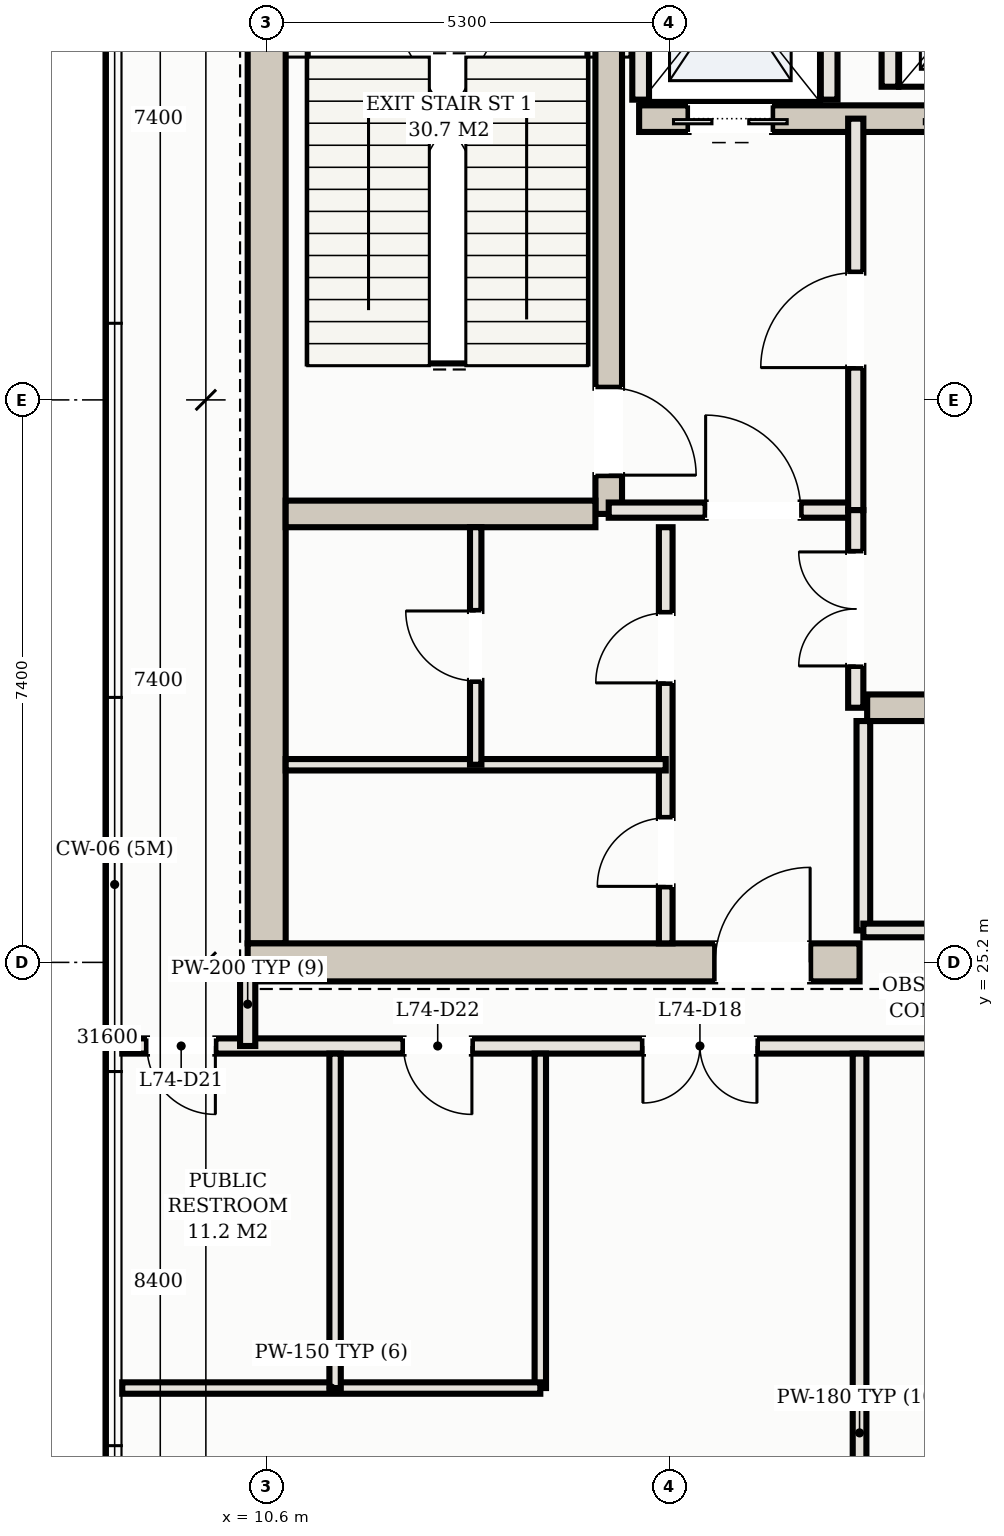
"""IFC4 building model, lengths in metres.
Left out: names, types, materials, properties, quantities, classifications, styles, units other than length and angle.
Written with IfcOpenShell. Run it as: python <this file> out.ifc"""

import sys

from ifc_helpers import new_model, si_unit, direction, frame, frame_2d, origin, place, context, subcontext, project, spatial, rectangle, extrude, element, fill, save


model = new_model("IFC4")
c1 = context("Model", 3, precision=1e-05, world=origin(), true_north=direction((0.0, 1.0)))
c2 = subcontext(c1, "Body", "Model", "MODEL_VIEW")
j1 = project(units=[si_unit("LENGTHUNIT", "METRE"), si_unit("PLANEANGLEUNIT", "RADIAN")], contexts=[c1])
p1 = place(None, origin())
s1 = spatial("IfcSite", under=j1, at=p1, CompositionType="ELEMENT")
p2 = place(p1, origin())
s2 = spatial("IfcBuilding", under=s1, at=p2, CompositionType="ELEMENT")
p3 = place(p2, frame((0.0, 0.0, 266.0)))
s3 = spatial("IfcBuildingStorey", under=s2, at=p3, CompositionType="ELEMENT", Elevation=266.0)
p4 = place(p3, frame((10.6, 25.45, 0.0), z_axis=(0.0, 0.0, 1.0), x_axis=(0.0, 1.0, 0.0)))
e1 = element("IfcWall", 1, at=p4, inside=s3, PredefinedType="SHEAR", context=c2, shape_type="SweptSolid", body=[
    extrude(rectangle(XDim=14.3, YDim=0.5, at=frame_2d((7.15, 0.0))), origin(), (0.0, 0.0, 1.0), 4.52),
])
p5 = place(p3, frame((10.35, 25.2, 0.0), z_axis=(0.0, 0.0, 1.0), x_axis=(1.0, 0.0, 0.0)))
e2 = element("IfcWall", 2, at=p5, inside=s3, PredefinedType="SHEAR", context=c2, shape_type="SweptSolid", body=[
    extrude(rectangle(XDim=8.05, YDim=0.5, at=frame_2d((4.025, 0.0))), origin(), (0.0, 0.0, 1.0), 4.52),
])
p6 = place(p5, frame((6.15, 0.0, 0.0)))
e3 = element("IfcOpeningElement", 3, at=p6, cuts=e2, PredefinedType="OPENING", context=c2, shape_type="SweptSolid", body=[
    extrude(rectangle(XDim=1.25, YDim=2.2, at=frame_2d((0.625, 1.1))), frame((0.0, 0.26, 0.0), z_axis=(0.0, -1.0, 0.0), x_axis=(1.0, 0.0, 0.0)), (0.0, 0.0, 1.0), 0.52),
])
p7 = place(p3, frame((15.1, 31.1, 0.0), z_axis=(0.0, 0.0, 1.0), x_axis=(0.0, 1.0, 0.0)))
e4 = element("IfcWall", 4, at=p7, inside=s3, PredefinedType="SHEAR", context=c2, shape_type="SweptSolid", body=[
    extrude(rectangle(XDim=8.65, YDim=0.35, at=frame_2d((4.325, 0.0))), origin(), (0.0, 0.0, 1.0), 4.52),
])
p8 = place(p7, frame((0.51, 0.0, 0.0)))
e5 = element("IfcOpeningElement", 5, at=p8, cuts=e4, PredefinedType="OPENING", context=c2, shape_type="SweptSolid", body=[
    extrude(rectangle(XDim=1.15, YDim=2.2, at=frame_2d((0.575, 1.1))), frame((0.0, 0.185, 0.0), z_axis=(0.0, -1.0, 0.0), x_axis=(1.0, 0.0, 0.0)), (0.0, 0.0, 1.0), 0.37),
])
p9 = place(p3, frame((10.85, 31.1, 0.0), z_axis=(0.0, 0.0, 1.0), x_axis=(1.0, 0.0, 0.0)))
e6 = element("IfcWall", 6, at=p9, inside=s3, PredefinedType="SHEAR", context=c2, shape_type="SweptSolid", body=[
    extrude(rectangle(XDim=4.075, YDim=0.35, at=frame_2d((2.038, 0.0))), origin(), (0.0, 0.0, 1.0), 4.52),
])
p10 = place(p3, frame((15.5, 36.3, 0.0), z_axis=(0.0, 0.0, 1.0), x_axis=(1.0, 0.0, 0.0)))
e7 = element("IfcWall", 7, at=p10, inside=s3, PredefinedType="SHEAR", context=c2, shape_type="SweptSolid", body=[
    extrude(rectangle(XDim=22.0, YDim=0.35, at=frame_2d((11.0, 0.0))), origin(), (0.0, 0.0, 1.0), 4.52),
])
p11 = place(p10, frame((0.65, 0.0, 0.0)))
e8 = element("IfcOpeningElement", 8, at=p11, cuts=e7, PredefinedType="OPENING", context=c2, shape_type="SweptSolid", body=[
    extrude(rectangle(XDim=1.1, YDim=2.15, at=frame_2d((0.55, 1.075))), frame((0.0, 0.185, 0.0), z_axis=(0.0, -1.0, 0.0), x_axis=(1.0, 0.0, 0.0)), (0.0, 0.0, 1.0), 0.37),
])
p12 = place(p10, frame((20.25, 0.0, 0.0)))
e9 = element("IfcOpeningElement", 9, at=p12, cuts=e7, PredefinedType="OPENING", context=c2, shape_type="SweptSolid", body=[
    extrude(rectangle(XDim=1.1, YDim=2.15, at=frame_2d((0.55, 1.075))), frame((0.0, 0.185, 0.0), z_axis=(0.0, -1.0, 0.0), x_axis=(1.0, 0.0, 0.0)), (0.0, 0.0, 1.0), 0.37),
])
p13 = place(p10, frame((17.05, 0.0, 0.0)))
e10 = element("IfcOpeningElement", 10, at=p13, cuts=e7, PredefinedType="OPENING", context=c2, shape_type="SweptSolid", body=[
    extrude(rectangle(XDim=1.3, YDim=2.2, at=frame_2d((0.65, 1.1))), frame((0.0, 0.185, 0.0), z_axis=(0.0, -1.0, 0.0), x_axis=(1.0, 0.0, 0.0)), (0.0, 0.0, 1.0), 0.37),
])
p14 = place(p10, frame((3.95, 0.0, 0.0)))
e11 = element("IfcOpeningElement", 11, at=p14, cuts=e7, PredefinedType="OPENING", context=c2, shape_type="SweptSolid", body=[
    extrude(rectangle(XDim=1.1, YDim=2.15, at=frame_2d((0.55, 1.075))), frame((0.0, 0.185, 0.0), z_axis=(0.0, -1.0, 0.0), x_axis=(1.0, 0.0, 0.0)), (0.0, 0.0, 1.0), 0.37),
])
p15 = place(p10, frame((6.55, 0.0, 0.0)))
e12 = element("IfcOpeningElement", 12, at=p15, cuts=e7, PredefinedType="OPENING", context=c2, shape_type="SweptSolid", body=[
    extrude(rectangle(XDim=1.1, YDim=2.15, at=frame_2d((0.55, 1.075))), frame((0.0, 0.185, 0.0), z_axis=(0.0, -1.0, 0.0), x_axis=(1.0, 0.0, 0.0)), (0.0, 0.0, 1.0), 0.37),
])
p16 = place(p10, frame((9.15, 0.0, 0.0)))
e13 = element("IfcOpeningElement", 13, at=p16, cuts=e7, PredefinedType="OPENING", context=c2, shape_type="SweptSolid", body=[
    extrude(rectangle(XDim=1.1, YDim=2.15, at=frame_2d((0.55, 1.075))), frame((0.0, 0.185, 0.0), z_axis=(0.0, -1.0, 0.0), x_axis=(1.0, 0.0, 0.0)), (0.0, 0.0, 1.0), 0.37),
])
p17 = place(p3, frame((18.5, 28.55, 0.0), z_axis=(0.0, 0.0, 1.0), x_axis=(1.0, 0.0, 0.0)))
e14 = element("IfcWall", 14, at=p17, inside=s3, PredefinedType="SHEAR", context=c2, shape_type="SweptSolid", body=[
    extrude(rectangle(XDim=16.0, YDim=0.35, at=frame_2d((8.0, 0.0))), origin(), (0.0, 0.0, 1.0), 4.52),
])
for number, where, z_axis, x_axis in (
    (15, (15.52, 36.55, 0.0), (0.0, 0.0, 1.0), (0.0, 1.0, 0.0)),
    (16, (18.0, 36.55, 0.0), (0.0, 0.0, 1.0), (0.0, 1.0, 0.0)),
):
    element("IfcWall", number, at=place(p3, frame(where, z_axis=z_axis, x_axis=x_axis)), inside=s3, PredefinedType="SOLIDWALL", context=c2, shape_type="SweptSolid", body=[
        extrude(rectangle(XDim=2.93, YDim=0.22, at=frame_2d((1.465, 0.0))), origin(), (0.0, 0.0, 1.0), 4.52),
    ])
p18 = place(p3, frame((18.8, 36.72, 0.0), z_axis=(0.0, 0.0, 1.0), x_axis=(0.0, 1.0, 0.0)))
e17 = element("IfcWall", 17, at=p18, inside=s3, PredefinedType="SOLIDWALL", context=c2, shape_type="SweptSolid", body=[
    extrude(rectangle(XDim=2.56, YDim=0.22, at=frame_2d((1.28, 0.0))), origin(), (0.0, 0.0, 1.0), 4.52),
])
p19 = place(p3, frame((15.1, 31.15, 0.0), z_axis=(0.0, 0.0, 1.0), x_axis=(1.0, 0.0, 0.0)))
e18 = element("IfcWall", 18, at=p19, inside=s3, PredefinedType="PARTITIONING", context=c2, shape_type="SweptSolid", body=[
    extrude(rectangle(XDim=3.25, YDim=0.2, at=frame_2d((1.625, 0.0))), origin(), (0.0, 0.0, 1.0), 4.52),
])
p20 = place(p19, frame((1.275, 0.0, 0.0)))
e19 = element("IfcOpeningElement", 19, at=p20, cuts=e18, PredefinedType="OPENING", context=c2, shape_type="SweptSolid", body=[
    extrude(rectangle(XDim=1.25, YDim=2.2, at=frame_2d((0.625, 1.1))), frame((0.0, 0.11, 0.0), z_axis=(0.0, -1.0, 0.0), x_axis=(1.0, 0.0, 0.0)), (0.0, 0.0, 1.0), 0.22),
])
p21 = place(p3, frame((18.35, 31.15, 0.0), z_axis=(0.0, 0.0, 1.0), x_axis=(0.0, 1.0, 0.0)))
e20 = element("IfcWall", 20, at=p21, inside=s3, PredefinedType="PARTITIONING", context=c2, shape_type="SweptSolid", body=[
    extrude(rectangle(XDim=5.15, YDim=0.2, at=frame_2d((2.575, 0.0))), origin(), (0.0, 0.0, 1.0), 4.52),
])
p22 = place(p21, frame((1.875, 0.0, 0.0)))
e21 = element("IfcOpeningElement", 21, at=p22, cuts=e20, PredefinedType="OPENING", context=c2, shape_type="SweptSolid", body=[
    extrude(rectangle(XDim=1.25, YDim=2.2, at=frame_2d((0.625, 1.1))), frame((0.0, 0.11, 0.0), z_axis=(0.0, -1.0, 0.0), x_axis=(1.0, 0.0, 0.0)), (0.0, 0.0, 1.0), 0.22),
])
p23 = place(p3, frame((15.85, 25.45, 0.0), z_axis=(0.0, 0.0, 1.0), x_axis=(0.0, 1.0, 0.0)))
e22 = element("IfcWall", 22, at=p23, inside=s3, PredefinedType="PARTITIONING", context=c2, shape_type="SweptSolid", body=[
    extrude(rectangle(XDim=5.475, YDim=0.18, at=frame_2d((2.738, 0.0))), origin(), (0.0, 0.0, 1.0), 3.865),
])
p24 = place(p23, frame((0.75, 0.0, 0.0)))
e23 = element("IfcOpeningElement", 23, at=p24, cuts=e22, PredefinedType="OPENING", context=c2, shape_type="SweptSolid", body=[
    extrude(rectangle(XDim=0.9, YDim=2.15, at=frame_2d((0.45, 1.075))), frame((0.0, 0.1, 0.0), z_axis=(0.0, -1.0, 0.0), x_axis=(1.0, 0.0, 0.0)), (0.0, 0.0, 1.0), 0.2),
])
p25 = place(p23, frame((3.427, 0.0, 0.0)))
e24 = element("IfcOpeningElement", 24, at=p25, cuts=e22, PredefinedType="OPENING", context=c2, shape_type="SweptSolid", body=[
    extrude(rectangle(XDim=0.92, YDim=2.15, at=frame_2d((0.46, 1.075))), frame((0.0, 0.1, 0.0), z_axis=(0.0, -1.0, 0.0), x_axis=(1.0, 0.0, 0.0)), (0.0, 0.0, 1.0), 0.2),
])
p26 = place(p3, frame((10.85, 27.8, 0.0), z_axis=(0.0, 0.0, 1.0), x_axis=(1.0, 0.0, 0.0)))
e25 = element("IfcWall", 25, at=p26, inside=s3, PredefinedType="PARTITIONING", context=c2, shape_type="SweptSolid", body=[
    extrude(rectangle(XDim=5.0, YDim=0.15, at=frame_2d((2.5, 0.0))), origin(), (0.0, 0.0, 1.0), 4.52),
])
p27 = place(p3, frame((13.35, 27.8, 0.0), z_axis=(0.0, 0.0, 1.0), x_axis=(0.0, 1.0, 0.0)))
e26 = element("IfcWall", 26, at=p27, inside=s3, PredefinedType="PARTITIONING", context=c2, shape_type="SweptSolid", body=[
    extrude(rectangle(XDim=3.125, YDim=0.15, at=frame_2d((1.562, 0.0))), origin(), (0.0, 0.0, 1.0), 4.52),
])
p28 = place(p27, frame((1.103, 0.0, 0.0)))
e27 = element("IfcOpeningElement", 27, at=p28, cuts=e26, PredefinedType="OPENING", context=c2, shape_type="SweptSolid", body=[
    extrude(rectangle(XDim=0.92, YDim=2.15, at=frame_2d((0.46, 1.075))), frame((0.0, 0.085, 0.0), z_axis=(0.0, -1.0, 0.0), x_axis=(1.0, 0.0, 0.0)), (0.0, 0.0, 1.0), 0.17),
])
p29 = place(p3, frame((18.35, 28.55, 0.0), z_axis=(0.0, 0.0, 1.0), x_axis=(0.0, 1.0, 0.0)))
e28 = element("IfcWall", 28, at=p29, inside=s3, PredefinedType="PARTITIONING", context=c2, shape_type="SweptSolid", body=[
    extrude(rectangle(XDim=2.6, YDim=0.2, at=frame_2d((1.3, 0.0))), origin(), (0.0, 0.0, 1.0), 4.52),
])
p30 = place(p29, frame((0.55, 0.0, 0.0)))
e29 = element("IfcOpeningElement", 29, at=p30, cuts=e28, PredefinedType="OPENING", context=c2, shape_type="SweptSolid", body=[
    extrude(rectangle(XDim=1.5, YDim=2.25, at=frame_2d((0.75, 1.125))), frame((0.0, 0.11, 0.0), z_axis=(0.0, -1.0, 0.0), x_axis=(1.0, 0.0, 0.0)), (0.0, 0.0, 1.0), 0.22),
])
p31 = place(p3, frame((18.45, 25.62, 0.0), z_axis=(0.0, 0.0, 1.0), x_axis=(0.0, 1.0, 0.0)))
e30 = element("IfcWall", 30, at=p31, inside=s3, PredefinedType="PARTITIONING", context=c2, shape_type="SweptSolid", body=[
    extrude(rectangle(XDim=2.755, YDim=0.18, at=frame_2d((1.377, 0.0))), origin(), (0.0, 0.0, 1.0), 4.52),
])
p32 = place(p3, frame((18.45, 25.62, 0.0), z_axis=(0.0, 0.0, 1.0), x_axis=(1.0, 0.0, 0.0)))
e31 = element("IfcWall", 31, at=p32, inside=s3, PredefinedType="PARTITIONING", context=c2, shape_type="SweptSolid", body=[
    extrude(rectangle(XDim=7.9, YDim=0.18, at=frame_2d((3.95, 0.0))), origin(), (0.0, 0.0, 1.0), 4.52),
])
p33 = place(p32, frame((3.34, 0.0, 0.0)))
e32 = element("IfcOpeningElement", 32, at=p33, cuts=e31, PredefinedType="OPENING", context=c2, shape_type="SweptSolid", body=[
    extrude(rectangle(XDim=0.92, YDim=2.15, at=frame_2d((0.46, 1.075))), frame((0.0, 0.1, 0.0), z_axis=(0.0, -1.0, 0.0), x_axis=(1.0, 0.0, 0.0)), (0.0, 0.0, 1.0), 0.2),
])
p34 = place(p3, frame((8.7, 24.1, 0.0), z_axis=(0.0, 0.0, 1.0), x_axis=(1.0, 0.0, 0.0)))
e33 = element("IfcWall", 33, at=p34, inside=s3, PredefinedType="PARTITIONING", context=c2, shape_type="SweptSolid", body=[
    extrude(rectangle(XDim=35.6, YDim=0.2, at=frame_2d((17.8, 0.0))), origin(), (0.0, 0.0, 1.0), 4.52),
])
p35 = place(p34, frame((6.85, 0.0, 0.0)))
e34 = element("IfcOpeningElement", 34, at=p35, cuts=e33, PredefinedType="OPENING", context=c2, shape_type="SweptSolid", body=[
    extrude(rectangle(XDim=1.5, YDim=2.25, at=frame_2d((0.75, 1.125))), frame((0.0, 0.11, 0.0), z_axis=(0.0, -1.0, 0.0), x_axis=(1.0, 0.0, 0.0)), (0.0, 0.0, 1.0), 0.22),
])
p36 = place(p34, frame((18.85, 0.0, 0.0)))
e35 = element("IfcOpeningElement", 35, at=p36, cuts=e33, PredefinedType="OPENING", context=c2, shape_type="SweptSolid", body=[
    extrude(rectangle(XDim=1.5, YDim=2.25, at=frame_2d((0.75, 1.125))), frame((0.0, 0.11, 0.0), z_axis=(0.0, -1.0, 0.0), x_axis=(1.0, 0.0, 0.0)), (0.0, 0.0, 1.0), 0.22),
])
p37 = place(p34, frame((30.15, 0.0, 0.0)))
e36 = element("IfcOpeningElement", 36, at=p37, cuts=e33, PredefinedType="OPENING", context=c2, shape_type="SweptSolid", body=[
    extrude(rectangle(XDim=1.5, YDim=2.25, at=frame_2d((0.75, 1.125))), frame((0.0, 0.11, 0.0), z_axis=(0.0, -1.0, 0.0), x_axis=(1.0, 0.0, 0.0)), (0.0, 0.0, 1.0), 0.22),
])
p38 = place(p34, frame((0.325, 0.0, 0.0)))
e37 = element("IfcOpeningElement", 37, at=p38, cuts=e33, PredefinedType="OPENING", context=c2, shape_type="SweptSolid", body=[
    extrude(rectangle(XDim=0.9, YDim=2.15, at=frame_2d((0.45, 1.075))), frame((0.0, 0.11, 0.0), z_axis=(0.0, -1.0, 0.0), x_axis=(1.0, 0.0, 0.0)), (0.0, 0.0, 1.0), 0.22),
])
p39 = place(p34, frame((3.7, 0.0, 0.0)))
e38 = element("IfcOpeningElement", 38, at=p39, cuts=e33, PredefinedType="OPENING", context=c2, shape_type="SweptSolid", body=[
    extrude(rectangle(XDim=0.9, YDim=2.15, at=frame_2d((0.45, 1.075))), frame((0.0, 0.11, 0.0), z_axis=(0.0, -1.0, 0.0), x_axis=(1.0, 0.0, 0.0)), (0.0, 0.0, 1.0), 0.22),
])
p40 = place(p3, frame((18.4, 14.02, 0.0), z_axis=(0.0, 0.0, 1.0), x_axis=(0.0, 1.0, 0.0)))
e39 = element("IfcWall", 39, at=p40, inside=s3, PredefinedType="PARTITIONING", context=c2, shape_type="SweptSolid", body=[
    extrude(rectangle(XDim=9.98, YDim=0.18, at=frame_2d((4.99, 0.0))), origin(), (0.0, 0.0, 1.0), 4.52),
])
p41 = place(p3, frame((10.35, 24.1, 0.0), z_axis=(0.0, 0.0, 1.0), x_axis=(0.0, 1.0, 0.0)))
e40 = element("IfcWall", 40, at=p41, inside=s3, PredefinedType="PARTITIONING", context=c2, shape_type="SweptSolid", body=[
    extrude(rectangle(XDim=1.1, YDim=0.2, at=frame_2d((0.55, 0.0))), origin(), (0.0, 0.0, 1.0), 3.865),
])
p42 = place(p3, frame((14.2, 19.6, 0.0), z_axis=(0.0, 0.0, 1.0), x_axis=(0.0, 1.0, 0.0)))
e41 = element("IfcWall", 41, at=p42, inside=s3, PredefinedType="PARTITIONING", context=c2, shape_type="SweptSolid", body=[
    extrude(rectangle(XDim=4.4, YDim=0.15, at=frame_2d((2.2, 0.0))), origin(), (0.0, 0.0, 1.0), 4.52),
])
p43 = place(p3, frame((8.7, 19.6, 0.0), z_axis=(0.0, 0.0, 1.0), x_axis=(1.0, 0.0, 0.0)))
e42 = element("IfcWall", 42, at=p43, inside=s3, PredefinedType="PARTITIONING", context=c2, shape_type="SweptSolid", body=[
    extrude(rectangle(XDim=5.5, YDim=0.15, at=frame_2d((2.75, 0.0))), origin(), (0.0, 0.0, 1.0), 4.52),
])
p44 = place(p3, frame((11.5, 19.6, 0.0), z_axis=(0.0, 0.0, 1.0), x_axis=(0.0, 1.0, 0.0)))
e43 = element("IfcWall", 43, at=p44, inside=s3, PredefinedType="PARTITIONING", context=c2, shape_type="SweptSolid", body=[
    extrude(rectangle(XDim=4.4, YDim=0.15, at=frame_2d((2.2, 0.0))), origin(), (0.0, 0.0, 1.0), 4.52),
])
p45 = place(p11, frame((1.1, 0.0, 0.0), z_axis=(0.0, 0.0, 1.0), x_axis=(-1.0, 0.0, 0.0)))
e44 = element("IfcDoor", 44, at=p45, inside=s3, OperationType="DOUBLE_DOOR_SLIDING", PredefinedType="DOOR", context=c2, shape_type="SweptSolid", body=[
    extrude(rectangle(XDim=1.1, YDim=2.15, at=frame_2d((0.55, 1.075))), frame((0.0, 0.025, 0.0), z_axis=(0.0, -1.0, 0.0), x_axis=(1.0, 0.0, 0.0)), (0.0, 0.0, 1.0), 0.05),
])
fill(e8, e44)
p46 = place(p6, origin())
e45 = element("IfcDoor", 45, at=p46, inside=s3, OperationType="SINGLE_SWING_RIGHT", PredefinedType="DOOR", context=c2, shape_type="SweptSolid", body=[
    extrude(rectangle(XDim=1.25, YDim=2.2, at=frame_2d((0.625, 1.1))), frame((0.0, 0.025, 0.0), z_axis=(0.0, -1.0, 0.0), x_axis=(1.0, 0.0, 0.0)), (0.0, 0.0, 1.0), 0.05),
])
fill(e3, e45)
p47 = place(p20, origin())
e46 = element("IfcDoor", 46, at=p47, inside=s3, OperationType="SINGLE_SWING_LEFT", PredefinedType="DOOR", context=c2, shape_type="SweptSolid", body=[
    extrude(rectangle(XDim=1.25, YDim=2.2, at=frame_2d((0.625, 1.1))), frame((0.0, 0.025, 0.0), z_axis=(0.0, -1.0, 0.0), x_axis=(1.0, 0.0, 0.0)), (0.0, 0.0, 1.0), 0.05),
])
fill(e19, e46)
p48 = place(p22, origin())
e47 = element("IfcDoor", 47, at=p48, inside=s3, OperationType="SINGLE_SWING_LEFT", PredefinedType="DOOR", context=c2, shape_type="SweptSolid", body=[
    extrude(rectangle(XDim=1.25, YDim=2.2, at=frame_2d((0.625, 1.1))), frame((0.0, 0.025, 0.0), z_axis=(0.0, -1.0, 0.0), x_axis=(1.0, 0.0, 0.0)), (0.0, 0.0, 1.0), 0.05),
])
fill(e21, e47)
p49 = place(p8, frame((1.15, 0.0, 0.0), z_axis=(0.0, 0.0, 1.0), x_axis=(-1.0, 0.0, 0.0)))
e48 = element("IfcDoor", 48, at=p49, inside=s3, OperationType="SINGLE_SWING_RIGHT", PredefinedType="DOOR", context=c2, shape_type="SweptSolid", body=[
    extrude(rectangle(XDim=1.15, YDim=2.2, at=frame_2d((0.575, 1.1))), frame((0.0, 0.025, 0.0), z_axis=(0.0, -1.0, 0.0), x_axis=(1.0, 0.0, 0.0)), (0.0, 0.0, 1.0), 0.05),
])
fill(e5, e48)
p50 = place(p24, origin())
e49 = element("IfcDoor", 49, at=p50, inside=s3, OperationType="SINGLE_SWING_LEFT", PredefinedType="DOOR", context=c2, shape_type="SweptSolid", body=[
    extrude(rectangle(XDim=0.9, YDim=2.15, at=frame_2d((0.45, 1.075))), frame((0.0, 0.025, 0.0), z_axis=(0.0, -1.0, 0.0), x_axis=(1.0, 0.0, 0.0)), (0.0, 0.0, 1.0), 0.05),
])
fill(e23, e49)
p51 = place(p25, origin())
e50 = element("IfcDoor", 50, at=p51, inside=s3, OperationType="SINGLE_SWING_LEFT", PredefinedType="DOOR", context=c2, shape_type="SweptSolid", body=[
    extrude(rectangle(XDim=0.92, YDim=2.15, at=frame_2d((0.46, 1.075))), frame((0.0, 0.025, 0.0), z_axis=(0.0, -1.0, 0.0), x_axis=(1.0, 0.0, 0.0)), (0.0, 0.0, 1.0), 0.05),
])
fill(e24, e50)
p52 = place(p28, origin())
e51 = element("IfcDoor", 51, at=p52, inside=s3, OperationType="SINGLE_SWING_RIGHT", PredefinedType="DOOR", context=c2, shape_type="SweptSolid", body=[
    extrude(rectangle(XDim=0.92, YDim=2.15, at=frame_2d((0.46, 1.075))), frame((0.0, 0.025, 0.0), z_axis=(0.0, -1.0, 0.0), x_axis=(1.0, 0.0, 0.0)), (0.0, 0.0, 1.0), 0.05),
])
fill(e27, e51)
p53 = place(p30, origin())
e52 = element("IfcDoor", 52, at=p53, inside=s3, OperationType="DOUBLE_DOOR_SINGLE_SWING", PredefinedType="DOOR", context=c2, shape_type="SweptSolid", body=[
    extrude(rectangle(XDim=1.5, YDim=2.25, at=frame_2d((0.75, 1.125))), frame((0.0, 0.025, 0.0), z_axis=(0.0, -1.0, 0.0), x_axis=(1.0, 0.0, 0.0)), (0.0, 0.0, 1.0), 0.05),
])
fill(e29, e52)
p54 = place(p35, frame((1.5, 0.0, 0.0), z_axis=(0.0, 0.0, 1.0), x_axis=(-1.0, 0.0, 0.0)))
e53 = element("IfcDoor", 53, at=p54, inside=s3, OperationType="DOUBLE_DOOR_SINGLE_SWING", PredefinedType="DOOR", context=c2, shape_type="SweptSolid", body=[
    extrude(rectangle(XDim=1.5, YDim=2.25, at=frame_2d((0.75, 1.125))), frame((0.0, 0.025, 0.0), z_axis=(0.0, -1.0, 0.0), x_axis=(1.0, 0.0, 0.0)), (0.0, 0.0, 1.0), 0.05),
])
fill(e34, e53)
p55 = place(p38, frame((0.9, 0.0, 0.0), z_axis=(0.0, 0.0, 1.0), x_axis=(-1.0, 0.0, 0.0)))
e54 = element("IfcDoor", 54, at=p55, inside=s3, OperationType="SINGLE_SWING_LEFT", PredefinedType="DOOR", context=c2, shape_type="SweptSolid", body=[
    extrude(rectangle(XDim=0.9, YDim=2.15, at=frame_2d((0.45, 1.075))), frame((0.0, 0.025, 0.0), z_axis=(0.0, -1.0, 0.0), x_axis=(1.0, 0.0, 0.0)), (0.0, 0.0, 1.0), 0.05),
])
fill(e37, e54)
p56 = place(p39, frame((0.9, 0.0, 0.0), z_axis=(0.0, 0.0, 1.0), x_axis=(-1.0, 0.0, 0.0)))
e55 = element("IfcDoor", 55, at=p56, inside=s3, OperationType="SINGLE_SWING_LEFT", PredefinedType="DOOR", context=c2, shape_type="SweptSolid", body=[
    extrude(rectangle(XDim=0.9, YDim=2.15, at=frame_2d((0.45, 1.075))), frame((0.0, 0.025, 0.0), z_axis=(0.0, -1.0, 0.0), x_axis=(1.0, 0.0, 0.0)), (0.0, 0.0, 1.0), 0.05),
])
fill(e38, e55)
save(model, sys.argv[1])
